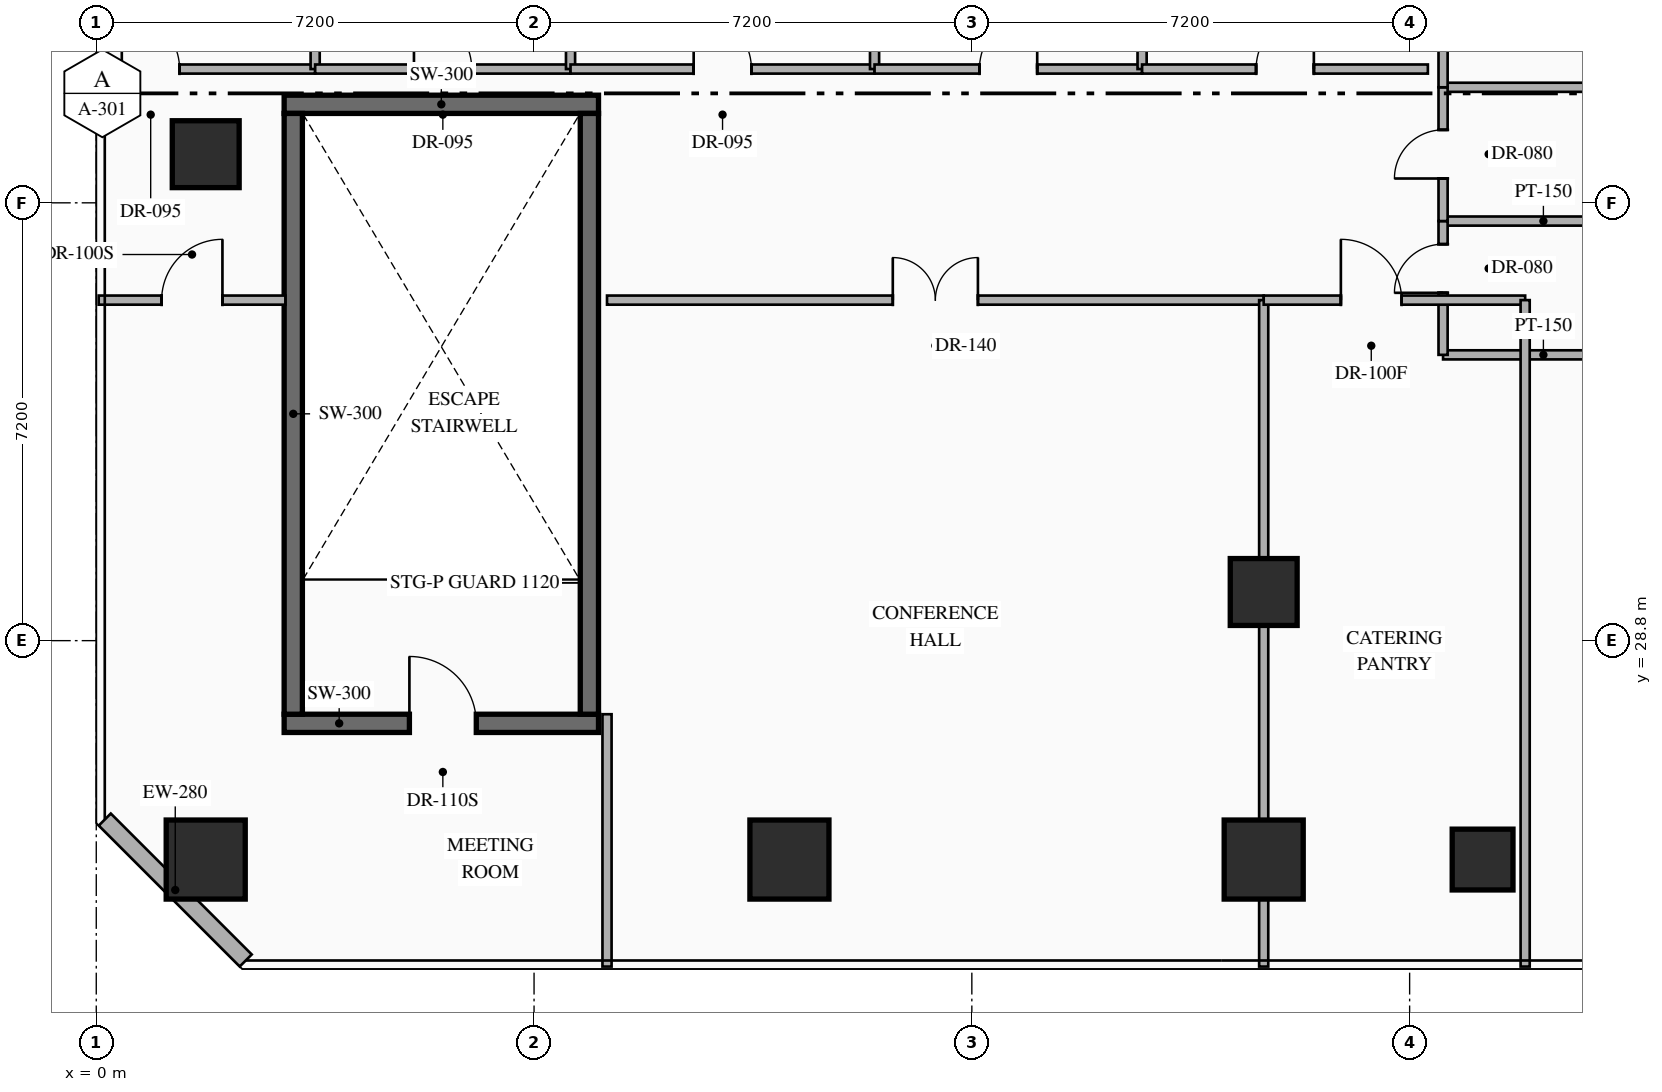
"""IFC4 building model, lengths in metres.
Left out: names, types, materials, properties, quantities, classifications, styles, units other than length and angle.
Written with IfcOpenShell. Run it as: python <this file> out.ifc"""

import sys

from ifc_helpers import new_model, si_unit, direction, frame, frame_2d, origin, origin_2d, place, context, subcontext, project, spatial, rectangle, hollow_rectangle, extrude, element, fill, save


model = new_model("IFC4")
c1 = context("Model", 3, precision=1e-05, world=origin(), true_north=direction((0.0, 1.0)))
c2 = subcontext(c1, "Body", "Model", "MODEL_VIEW")
j1 = project(units=[si_unit("LENGTHUNIT", "METRE"), si_unit("PLANEANGLEUNIT", "RADIAN")], contexts=[c1])
p1 = place(None, origin())
s1 = spatial("IfcSite", under=j1, at=p1, CompositionType="ELEMENT")
p2 = place(p1, origin())
s2 = spatial("IfcBuilding", under=s1, at=p2, CompositionType="ELEMENT")
p3 = place(p2, frame((0.0, 0.0, 21.6)))
s3 = spatial("IfcBuildingStorey", under=s2, at=p3, CompositionType="ELEMENT", Elevation=21.6)
p4 = place(p3, frame((3.09, 27.44, 0.0), z_axis=(0.0, 0.0, 1.0), x_axis=(1.0, 0.0, 0.0)))
e1 = element("IfcWall", 1, at=p4, inside=s3, PredefinedType="SHEAR", context=c2, shape_type="SweptSolid", body=[
    extrude(rectangle(XDim=5.17, YDim=0.3, at=frame_2d((2.585, 0.0))), origin(), (0.0, 0.0, 1.0), 5.1),
])
p5 = place(p4, frame((2.06, 0.0, 0.0)))
e2 = element("IfcOpeningElement", 2, at=p5, cuts=e1, PredefinedType="OPENING", context=c2, shape_type="SweptSolid", body=[
    extrude(rectangle(XDim=1.1, YDim=2.2, at=frame_2d((0.55, 1.1))), frame((0.0, 0.16, 0.0), z_axis=(0.0, -1.0, 0.0), x_axis=(1.0, 0.0, 0.0)), (0.0, 0.0, 1.0), 0.32),
])
p6 = place(p3, frame((3.09, 37.62, 0.0), z_axis=(0.0, 0.0, 1.0), x_axis=(1.0, 0.0, 0.0)))
e3 = element("IfcWall", 3, at=p6, inside=s3, PredefinedType="SHEAR", context=c2, shape_type="SweptSolid", body=[
    extrude(rectangle(XDim=5.17, YDim=0.3, at=frame_2d((2.585, 0.0))), origin(), (0.0, 0.0, 1.0), 5.1),
])
for number, where, z_axis, x_axis in (
    (4, (3.24, 27.59, 0.0), (0.0, 0.0, 1.0), (0.0, 1.0, 0.0)),
    (5, (8.11, 27.59, 0.0), (0.0, 0.0, 1.0), (0.0, 1.0, 0.0)),
):
    element("IfcWall", number, at=place(p3, frame(where, z_axis=z_axis, x_axis=x_axis)), inside=s3, PredefinedType="SHEAR", context=c2, shape_type="SweptSolid", body=[
        extrude(rectangle(XDim=9.88, YDim=0.3, at=frame_2d((4.94, 0.0))), origin(), (0.0, 0.0, 1.0), 5.1),
    ])
p7 = place(p3, frame((1.8, 25.2, 0.0), z_axis=(0.0, 0.0, 1.0), x_axis=(1.0, 0.0, 0.0)))
e6 = element("IfcColumn", 6, at=p7, inside=s3, PredefinedType="COLUMN", context=c2, shape_type="SweptSolid", body=[
    extrude(rectangle(XDim=1.3, YDim=1.3, at=origin_2d()), origin(), (0.0, 0.0, 1.0), 5.4),
])
p8 = place(p3, frame((1.8, 36.8, 0.0), z_axis=(0.0, 0.0, 1.0), x_axis=(1.0, 0.0, 0.0)))
e7 = element("IfcColumn", 7, at=p8, inside=s3, PredefinedType="COLUMN", context=c2, shape_type="SweptSolid", body=[
    extrude(hollow_rectangle(XDim=1.1, YDim=1.1, WallThickness=0.04, at=origin_2d()), origin(), (0.0, 0.0, 1.0), 5.4),
])
for number, where, z_axis, x_axis in (
    (8, (11.4, 25.2, 0.0), (0.0, 0.0, 1.0), (1.0, 0.0, 0.0)),
    (9, (19.2, 25.2, 0.0), (0.0, 0.0, 1.0), (1.0, 0.0, 0.0)),
):
    element("IfcColumn", number, at=place(p3, frame(where, z_axis=z_axis, x_axis=x_axis)), inside=s3, PredefinedType="COLUMN", context=c2, shape_type="SweptSolid", body=[
        extrude(rectangle(XDim=1.3, YDim=1.3, at=origin_2d()), origin(), (0.0, 0.0, 1.0), 5.4),
    ])
p9 = place(p3, frame((19.2, 29.6, 0.0), z_axis=(0.0, 0.0, 1.0), x_axis=(1.0, 0.0, 0.0)))
e10 = element("IfcColumn", 10, at=p9, inside=s3, PredefinedType="COLUMN", context=c2, shape_type="SweptSolid", body=[
    extrude(hollow_rectangle(XDim=1.1, YDim=1.1, WallThickness=0.04, at=origin_2d()), origin(), (0.0, 0.0, 1.0), 5.4),
])
p10 = place(p3, frame((22.8, 25.2, 0.0), z_axis=(0.0, 0.0, 1.0), x_axis=(1.0, 0.0, 0.0)))
e11 = element("IfcColumn", 11, at=p10, inside=s3, PredefinedType="COLUMN", context=c2, shape_type="SweptSolid", body=[
    extrude(hollow_rectangle(XDim=1.0, YDim=1.0, WallThickness=0.038, at=origin_2d()), origin(), (0.0, 0.0, 1.0), 5.4),
])
p11 = place(p3, frame((2.458, 23.54, 0.0), z_axis=(0.0, 0.0, 1.0), x_axis=(-0.707144017911, 0.707069542501, 0.0)))
e12 = element("IfcWall", 12, at=p11, inside=s3, PredefinedType="STANDARD", context=c2, shape_type="SweptSolid", body=[
    extrude(rectangle(XDim=3.278, YDim=0.28, at=frame_2d((1.639, 0.0))), origin(), (0.0, 0.0, 1.0), 5.1),
])
for number, where, z_axis, x_axis in (
    (13, (22.15, 33.5, 0.0), (0.0, 0.0, 1.0), (1.0, 0.0, 0.0)),
    (14, (22.15, 35.7, 0.0), (0.0, 0.0, 1.0), (1.0, 0.0, 0.0)),
    (15, (22.15, 37.9, 0.0), (0.0, 0.0, 1.0), (1.0, 0.0, 0.0)),
):
    element("IfcWall", number, at=place(p3, frame(where, z_axis=z_axis, x_axis=x_axis)), inside=s3, PredefinedType="PARTITIONING", context=c2, shape_type="SweptSolid", body=[
        extrude(rectangle(XDim=3.3, YDim=0.15, at=frame_2d((1.65, 0.0))), origin(), (0.0, 0.0, 1.0), 5.1),
    ])
p12 = place(p3, frame((22.15, 33.5, 0.0), z_axis=(0.0, 0.0, 1.0), x_axis=(0.0, 1.0, 0.0)))
e16 = element("IfcWall", 16, at=p12, inside=s3, PredefinedType="PARTITIONING", context=c2, shape_type="SweptSolid", body=[
    extrude(rectangle(XDim=2.2, YDim=0.15, at=frame_2d((1.1, 0.0))), origin(), (0.0, 0.0, 1.0), 5.1),
])
p13 = place(p12, frame((1.02, 0.0, 0.0)))
e17 = element("IfcOpeningElement", 17, at=p13, cuts=e16, PredefinedType="OPENING", context=c2, shape_type="SweptSolid", body=[
    extrude(rectangle(XDim=0.8, YDim=2.06, at=frame_2d((0.4, 1.03))), frame((0.0, 0.085, 0.0), z_axis=(0.0, -1.0, 0.0), x_axis=(1.0, 0.0, 0.0)), (0.0, 0.0, 1.0), 0.17),
])
p14 = place(p3, frame((22.15, 35.7, 0.0), z_axis=(0.0, 0.0, 1.0), x_axis=(0.0, 1.0, 0.0)))
e18 = element("IfcWall", 18, at=p14, inside=s3, PredefinedType="PARTITIONING", context=c2, shape_type="SweptSolid", body=[
    extrude(rectangle(XDim=2.2, YDim=0.15, at=frame_2d((1.1, 0.0))), origin(), (0.0, 0.0, 1.0), 5.1),
])
p15 = place(p14, frame((0.7, 0.0, 0.0)))
e19 = element("IfcOpeningElement", 19, at=p15, cuts=e18, PredefinedType="OPENING", context=c2, shape_type="SweptSolid", body=[
    extrude(rectangle(XDim=0.8, YDim=2.06, at=frame_2d((0.4, 1.03))), frame((0.0, 0.085, 0.0), z_axis=(0.0, -1.0, 0.0), x_axis=(1.0, 0.0, 0.0)), (0.0, 0.0, 1.0), 0.17),
])
p16 = place(p3, frame((22.15, 37.9, 0.0), z_axis=(0.0, 0.0, 1.0), x_axis=(0.0, 1.0, 0.0)))
e20 = element("IfcWall", 20, at=p16, inside=s3, PredefinedType="PARTITIONING", context=c2, shape_type="SweptSolid", body=[
    extrude(rectangle(XDim=2.2, YDim=0.15, at=frame_2d((1.1, 0.0))), origin(), (0.0, 0.0, 1.0), 5.1),
])
p17 = place(p16, frame((0.86, 0.0, 0.0)))
e21 = element("IfcOpeningElement", 21, at=p17, cuts=e20, PredefinedType="OPENING", context=c2, shape_type="SweptSolid", body=[
    extrude(rectangle(XDim=0.8, YDim=2.06, at=frame_2d((0.4, 1.03))), frame((0.0, 0.085, 0.0), z_axis=(0.0, -1.0, 0.0), x_axis=(1.0, 0.0, 0.0)), (0.0, 0.0, 1.0), 0.17),
])
p18 = place(p3, frame((0.04, 38.2, 0.0), z_axis=(0.0, 0.0, 1.0), x_axis=(1.0, 0.0, 0.0)))
e22 = element("IfcWall", 22, at=p18, inside=s3, PredefinedType="PARTITIONING", context=c2, shape_type="SweptSolid", body=[
    extrude(rectangle(XDim=3.56, YDim=0.15, at=frame_2d((1.78, 0.0))), origin(), (0.0, 0.0, 1.0), 5.1),
])
p19 = place(p18, frame((0.38, 0.0, 0.0)))
e23 = element("IfcOpeningElement", 23, at=p19, cuts=e22, PredefinedType="OPENING", context=c2, shape_type="SweptSolid", body=[
    extrude(rectangle(XDim=0.95, YDim=2.15, at=frame_2d((0.475, 1.075))), frame((0.0, 0.085, 0.0), z_axis=(0.0, -1.0, 0.0), x_axis=(1.0, 0.0, 0.0)), (0.0, 0.0, 1.0), 0.17),
])
p20 = place(p3, frame((3.6, 38.2, 0.0), z_axis=(0.0, 0.0, 1.0), x_axis=(0.0, 1.0, 0.0)))
e24 = element("IfcWall", 24, at=p20, inside=s3, PredefinedType="PARTITIONING", context=c2, shape_type="SweptSolid", body=[
    extrude(rectangle(XDim=13.36, YDim=0.15, at=frame_2d((6.68, 0.0))), origin(), (0.0, 0.0, 1.0), 5.1),
])
p21 = place(p3, frame((3.6, 38.2, 0.0), z_axis=(0.0, 0.0, 1.0), x_axis=(1.0, 0.0, 0.0)))
e25 = element("IfcWall", 25, at=p21, inside=s3, PredefinedType="PARTITIONING", context=c2, shape_type="SweptSolid", body=[
    extrude(rectangle(XDim=4.2, YDim=0.15, at=frame_2d((2.1, 0.0))), origin(), (0.0, 0.0, 1.0), 5.1),
])
p22 = place(p21, frame((1.625, 0.0, 0.0)))
e26 = element("IfcOpeningElement", 26, at=p22, cuts=e25, PredefinedType="OPENING", context=c2, shape_type="SweptSolid", body=[
    extrude(rectangle(XDim=0.95, YDim=2.15, at=frame_2d((0.475, 1.075))), frame((0.0, 0.085, 0.0), z_axis=(0.0, -1.0, 0.0), x_axis=(1.0, 0.0, 0.0)), (0.0, 0.0, 1.0), 0.17),
])
p23 = place(p3, frame((7.8, 38.2, 0.0), z_axis=(0.0, 0.0, 1.0), x_axis=(0.0, 1.0, 0.0)))
e27 = element("IfcWall", 27, at=p23, inside=s3, PredefinedType="PARTITIONING", context=c2, shape_type="SweptSolid", body=[
    extrude(rectangle(XDim=13.36, YDim=0.15, at=frame_2d((6.68, 0.0))), origin(), (0.0, 0.0, 1.0), 5.1),
])
p24 = place(p3, frame((7.8, 38.2, 0.0), z_axis=(0.0, 0.0, 1.0), x_axis=(1.0, 0.0, 0.0)))
e28 = element("IfcWall", 28, at=p24, inside=s3, PredefinedType="PARTITIONING", context=c2, shape_type="SweptSolid", body=[
    extrude(rectangle(XDim=5.0, YDim=0.15, at=frame_2d((2.5, 0.0))), origin(), (0.0, 0.0, 1.0), 5.1),
])
p25 = place(p24, frame((2.025, 0.0, 0.0)))
e29 = element("IfcOpeningElement", 29, at=p25, cuts=e28, PredefinedType="OPENING", context=c2, shape_type="SweptSolid", body=[
    extrude(rectangle(XDim=0.95, YDim=2.15, at=frame_2d((0.475, 1.075))), frame((0.0, 0.085, 0.0), z_axis=(0.0, -1.0, 0.0), x_axis=(1.0, 0.0, 0.0)), (0.0, 0.0, 1.0), 0.17),
])
p26 = place(p3, frame((12.8, 38.2, 0.0), z_axis=(0.0, 0.0, 1.0), x_axis=(0.0, 1.0, 0.0)))
e30 = element("IfcWall", 30, at=p26, inside=s3, PredefinedType="PARTITIONING", context=c2, shape_type="SweptSolid", body=[
    extrude(rectangle(XDim=13.36, YDim=0.15, at=frame_2d((6.68, 0.0))), origin(), (0.0, 0.0, 1.0), 5.1),
])
p27 = place(p3, frame((12.8, 38.2, 0.0), z_axis=(0.0, 0.0, 1.0), x_axis=(1.0, 0.0, 0.0)))
e31 = element("IfcWall", 31, at=p27, inside=s3, PredefinedType="PARTITIONING", context=c2, shape_type="SweptSolid", body=[
    extrude(rectangle(XDim=4.4, YDim=0.15, at=frame_2d((2.2, 0.0))), origin(), (0.0, 0.0, 1.0), 5.1),
])
p28 = place(p27, frame((1.725, 0.0, 0.0)))
e32 = element("IfcOpeningElement", 32, at=p28, cuts=e31, PredefinedType="OPENING", context=c2, shape_type="SweptSolid", body=[
    extrude(rectangle(XDim=0.95, YDim=2.15, at=frame_2d((0.475, 1.075))), frame((0.0, 0.085, 0.0), z_axis=(0.0, -1.0, 0.0), x_axis=(1.0, 0.0, 0.0)), (0.0, 0.0, 1.0), 0.17),
])
p29 = place(p3, frame((17.2, 38.2, 0.0), z_axis=(0.0, 0.0, 1.0), x_axis=(0.0, 1.0, 0.0)))
e33 = element("IfcWall", 33, at=p29, inside=s3, PredefinedType="PARTITIONING", context=c2, shape_type="SweptSolid", body=[
    extrude(rectangle(XDim=13.36, YDim=0.15, at=frame_2d((6.68, 0.0))), origin(), (0.0, 0.0, 1.0), 5.1),
])
p30 = place(p3, frame((17.2, 38.2, 0.0), z_axis=(0.0, 0.0, 1.0), x_axis=(1.0, 0.0, 0.0)))
e34 = element("IfcWall", 34, at=p30, inside=s3, PredefinedType="PARTITIONING", context=c2, shape_type="SweptSolid", body=[
    extrude(rectangle(XDim=4.7, YDim=0.15, at=frame_2d((2.35, 0.0))), origin(), (0.0, 0.0, 1.0), 5.1),
])
p31 = place(p30, frame((1.875, 0.0, 0.0)))
e35 = element("IfcOpeningElement", 35, at=p31, cuts=e34, PredefinedType="OPENING", context=c2, shape_type="SweptSolid", body=[
    extrude(rectangle(XDim=0.95, YDim=2.15, at=frame_2d((0.475, 1.075))), frame((0.0, 0.085, 0.0), z_axis=(0.0, -1.0, 0.0), x_axis=(1.0, 0.0, 0.0)), (0.0, 0.0, 1.0), 0.17),
])
p32 = place(p3, frame((0.04, 34.4, 0.0), z_axis=(0.0, 0.0, 1.0), x_axis=(1.0, 0.0, 0.0)))
e36 = element("IfcWall", 36, at=p32, inside=s3, PredefinedType="PARTITIONING", context=c2, shape_type="SweptSolid", body=[
    extrude(rectangle(XDim=3.07, YDim=0.15, at=frame_2d((1.535, 0.0))), origin(), (0.0, 0.0, 1.0), 5.1),
])
p33 = place(p32, frame((1.035, 0.0, 0.0)))
e37 = element("IfcOpeningElement", 37, at=p33, cuts=e36, PredefinedType="OPENING", context=c2, shape_type="SweptSolid", body=[
    extrude(rectangle(XDim=1.0, YDim=2.15, at=frame_2d((0.5, 1.075))), frame((0.0, 0.085, 0.0), z_axis=(0.0, -1.0, 0.0), x_axis=(1.0, 0.0, 0.0)), (0.0, 0.0, 1.0), 0.17),
])
p34 = place(p3, frame((8.4, 23.44, 0.0), z_axis=(0.0, 0.0, 1.0), x_axis=(0.0, 1.0, 0.0)))
e38 = element("IfcWall", 38, at=p34, inside=s3, PredefinedType="PARTITIONING", context=c2, shape_type="SweptSolid", body=[
    extrude(rectangle(XDim=4.15, YDim=0.15, at=frame_2d((2.075, 0.0))), origin(), (0.0, 0.0, 1.0), 5.1),
])
p35 = place(p3, frame((8.4, 34.4, 0.0), z_axis=(0.0, 0.0, 1.0), x_axis=(1.0, 0.0, 0.0)))
e39 = element("IfcWall", 39, at=p35, inside=s3, PredefinedType="PARTITIONING", context=c2, shape_type="SweptSolid", body=[
    extrude(rectangle(XDim=10.8, YDim=0.15, at=frame_2d((5.4, 0.0))), origin(), (0.0, 0.0, 1.0), 5.1),
])
p36 = place(p35, frame((4.7, 0.0, 0.0)))
e40 = element("IfcOpeningElement", 40, at=p36, cuts=e39, PredefinedType="OPENING", context=c2, shape_type="SweptSolid", body=[
    extrude(rectangle(XDim=1.4, YDim=2.3, at=frame_2d((0.7, 1.15))), frame((0.0, 0.085, 0.0), z_axis=(0.0, -1.0, 0.0), x_axis=(1.0, 0.0, 0.0)), (0.0, 0.0, 1.0), 0.17),
])
p37 = place(p3, frame((19.2, 23.44, 0.0), z_axis=(0.0, 0.0, 1.0), x_axis=(0.0, 1.0, 0.0)))
e41 = element("IfcWall", 41, at=p37, inside=s3, PredefinedType="PARTITIONING", context=c2, shape_type="SweptSolid", body=[
    extrude(rectangle(XDim=10.96, YDim=0.15, at=frame_2d((5.48, 0.0))), origin(), (0.0, 0.0, 1.0), 3.295),
])
p38 = place(p3, frame((19.2, 34.4, 0.0), z_axis=(0.0, 0.0, 1.0), x_axis=(1.0, 0.0, 0.0)))
e42 = element("IfcWall", 42, at=p38, inside=s3, PredefinedType="PARTITIONING", context=c2, shape_type="SweptSolid", body=[
    extrude(rectangle(XDim=4.3, YDim=0.15, at=frame_2d((2.15, 0.0))), origin(), (0.0, 0.0, 1.0), 5.1),
])
p39 = place(p38, frame((1.269, 0.0, 0.0)))
e43 = element("IfcOpeningElement", 43, at=p39, cuts=e42, PredefinedType="OPENING", context=c2, shape_type="SweptSolid", body=[
    extrude(rectangle(XDim=1.0, YDim=2.2, at=frame_2d((0.5, 1.1))), frame((0.0, 0.085, 0.0), z_axis=(0.0, -1.0, 0.0), x_axis=(1.0, 0.0, 0.0)), (0.0, 0.0, 1.0), 0.17),
])
p40 = place(p3, frame((23.5, 23.44, 0.0), z_axis=(0.0, 0.0, 1.0), x_axis=(0.0, 1.0, 0.0)))
e44 = element("IfcWall", 44, at=p40, inside=s3, PredefinedType="PARTITIONING", context=c2, shape_type="SweptSolid", body=[
    extrude(rectangle(XDim=10.96, YDim=0.15, at=frame_2d((5.48, 0.0))), origin(), (0.0, 0.0, 1.0), 5.1),
])
p41 = place(p5, origin())
e45 = element("IfcDoor", 45, at=p41, inside=s3, OperationType="SINGLE_SWING_LEFT", PredefinedType="DOOR", context=c2, shape_type="SweptSolid", body=[
    extrude(rectangle(XDim=1.1, YDim=2.2, at=frame_2d((0.55, 1.1))), frame((0.0, 0.025, 0.0), z_axis=(0.0, -1.0, 0.0), x_axis=(1.0, 0.0, 0.0)), (0.0, 0.0, 1.0), 0.05),
])
fill(e2, e45)
p42 = place(p13, origin())
e46 = element("IfcDoor", 46, at=p42, inside=s3, OperationType="SINGLE_SWING_LEFT", PredefinedType="DOOR", context=c2, shape_type="SweptSolid", body=[
    extrude(rectangle(XDim=0.8, YDim=2.06, at=frame_2d((0.4, 1.03))), frame((0.0, 0.025, 0.0), z_axis=(0.0, -1.0, 0.0), x_axis=(1.0, 0.0, 0.0)), (0.0, 0.0, 1.0), 0.05),
])
fill(e17, e46)
p43 = place(p15, origin())
e47 = element("IfcDoor", 47, at=p43, inside=s3, OperationType="SINGLE_SWING_LEFT", PredefinedType="DOOR", context=c2, shape_type="SweptSolid", body=[
    extrude(rectangle(XDim=0.8, YDim=2.06, at=frame_2d((0.4, 1.03))), frame((0.0, 0.025, 0.0), z_axis=(0.0, -1.0, 0.0), x_axis=(1.0, 0.0, 0.0)), (0.0, 0.0, 1.0), 0.05),
])
fill(e19, e47)
p44 = place(p19, origin())
e48 = element("IfcDoor", 48, at=p44, inside=s3, OperationType="SINGLE_SWING_LEFT", PredefinedType="DOOR", context=c2, shape_type="SweptSolid", body=[
    extrude(rectangle(XDim=0.95, YDim=2.15, at=frame_2d((0.475, 1.075))), frame((0.0, 0.025, 0.0), z_axis=(0.0, -1.0, 0.0), x_axis=(1.0, 0.0, 0.0)), (0.0, 0.0, 1.0), 0.05),
])
fill(e23, e48)
p45 = place(p22, origin())
e49 = element("IfcDoor", 49, at=p45, inside=s3, OperationType="SINGLE_SWING_LEFT", PredefinedType="DOOR", context=c2, shape_type="SweptSolid", body=[
    extrude(rectangle(XDim=0.95, YDim=2.15, at=frame_2d((0.475, 1.075))), frame((0.0, 0.025, 0.0), z_axis=(0.0, -1.0, 0.0), x_axis=(1.0, 0.0, 0.0)), (0.0, 0.0, 1.0), 0.05),
])
fill(e26, e49)
p46 = place(p25, origin())
e50 = element("IfcDoor", 50, at=p46, inside=s3, OperationType="SINGLE_SWING_LEFT", PredefinedType="DOOR", context=c2, shape_type="SweptSolid", body=[
    extrude(rectangle(XDim=0.95, YDim=2.15, at=frame_2d((0.475, 1.075))), frame((0.0, 0.025, 0.0), z_axis=(0.0, -1.0, 0.0), x_axis=(1.0, 0.0, 0.0)), (0.0, 0.0, 1.0), 0.05),
])
fill(e29, e50)
p47 = place(p28, origin())
e51 = element("IfcDoor", 51, at=p47, inside=s3, OperationType="SINGLE_SWING_RIGHT", PredefinedType="DOOR", context=c2, shape_type="SweptSolid", body=[
    extrude(rectangle(XDim=0.95, YDim=2.15, at=frame_2d((0.475, 1.075))), frame((0.0, 0.025, 0.0), z_axis=(0.0, -1.0, 0.0), x_axis=(1.0, 0.0, 0.0)), (0.0, 0.0, 1.0), 0.05),
])
fill(e32, e51)
p48 = place(p31, origin())
e52 = element("IfcDoor", 52, at=p48, inside=s3, OperationType="SINGLE_SWING_RIGHT", PredefinedType="DOOR", context=c2, shape_type="SweptSolid", body=[
    extrude(rectangle(XDim=0.95, YDim=2.15, at=frame_2d((0.475, 1.075))), frame((0.0, 0.025, 0.0), z_axis=(0.0, -1.0, 0.0), x_axis=(1.0, 0.0, 0.0)), (0.0, 0.0, 1.0), 0.05),
])
fill(e35, e52)
p49 = place(p33, origin())
e53 = element("IfcDoor", 53, at=p49, inside=s3, OperationType="SINGLE_SWING_RIGHT", PredefinedType="DOOR", context=c2, shape_type="SweptSolid", body=[
    extrude(rectangle(XDim=1.0, YDim=2.15, at=frame_2d((0.5, 1.075))), frame((0.0, 0.025, 0.0), z_axis=(0.0, -1.0, 0.0), x_axis=(1.0, 0.0, 0.0)), (0.0, 0.0, 1.0), 0.05),
])
fill(e37, e53)
p50 = place(p36, origin())
e54 = element("IfcDoor", 54, at=p50, inside=s3, OperationType="DOUBLE_DOOR_SINGLE_SWING", PredefinedType="DOOR", context=c2, shape_type="SweptSolid", body=[
    extrude(rectangle(XDim=1.4, YDim=2.3, at=frame_2d((0.7, 1.15))), frame((0.0, 0.025, 0.0), z_axis=(0.0, -1.0, 0.0), x_axis=(1.0, 0.0, 0.0)), (0.0, 0.0, 1.0), 0.05),
])
fill(e40, e54)
p51 = place(p39, origin())
e55 = element("IfcDoor", 55, at=p51, inside=s3, OperationType="SINGLE_SWING_LEFT", PredefinedType="DOOR", context=c2, shape_type="SweptSolid", body=[
    extrude(rectangle(XDim=1.0, YDim=2.2, at=frame_2d((0.5, 1.1))), frame((0.0, 0.025, 0.0), z_axis=(0.0, -1.0, 0.0), x_axis=(1.0, 0.0, 0.0)), (0.0, 0.0, 1.0), 0.05),
])
fill(e43, e55)
save(model, sys.argv[1])
